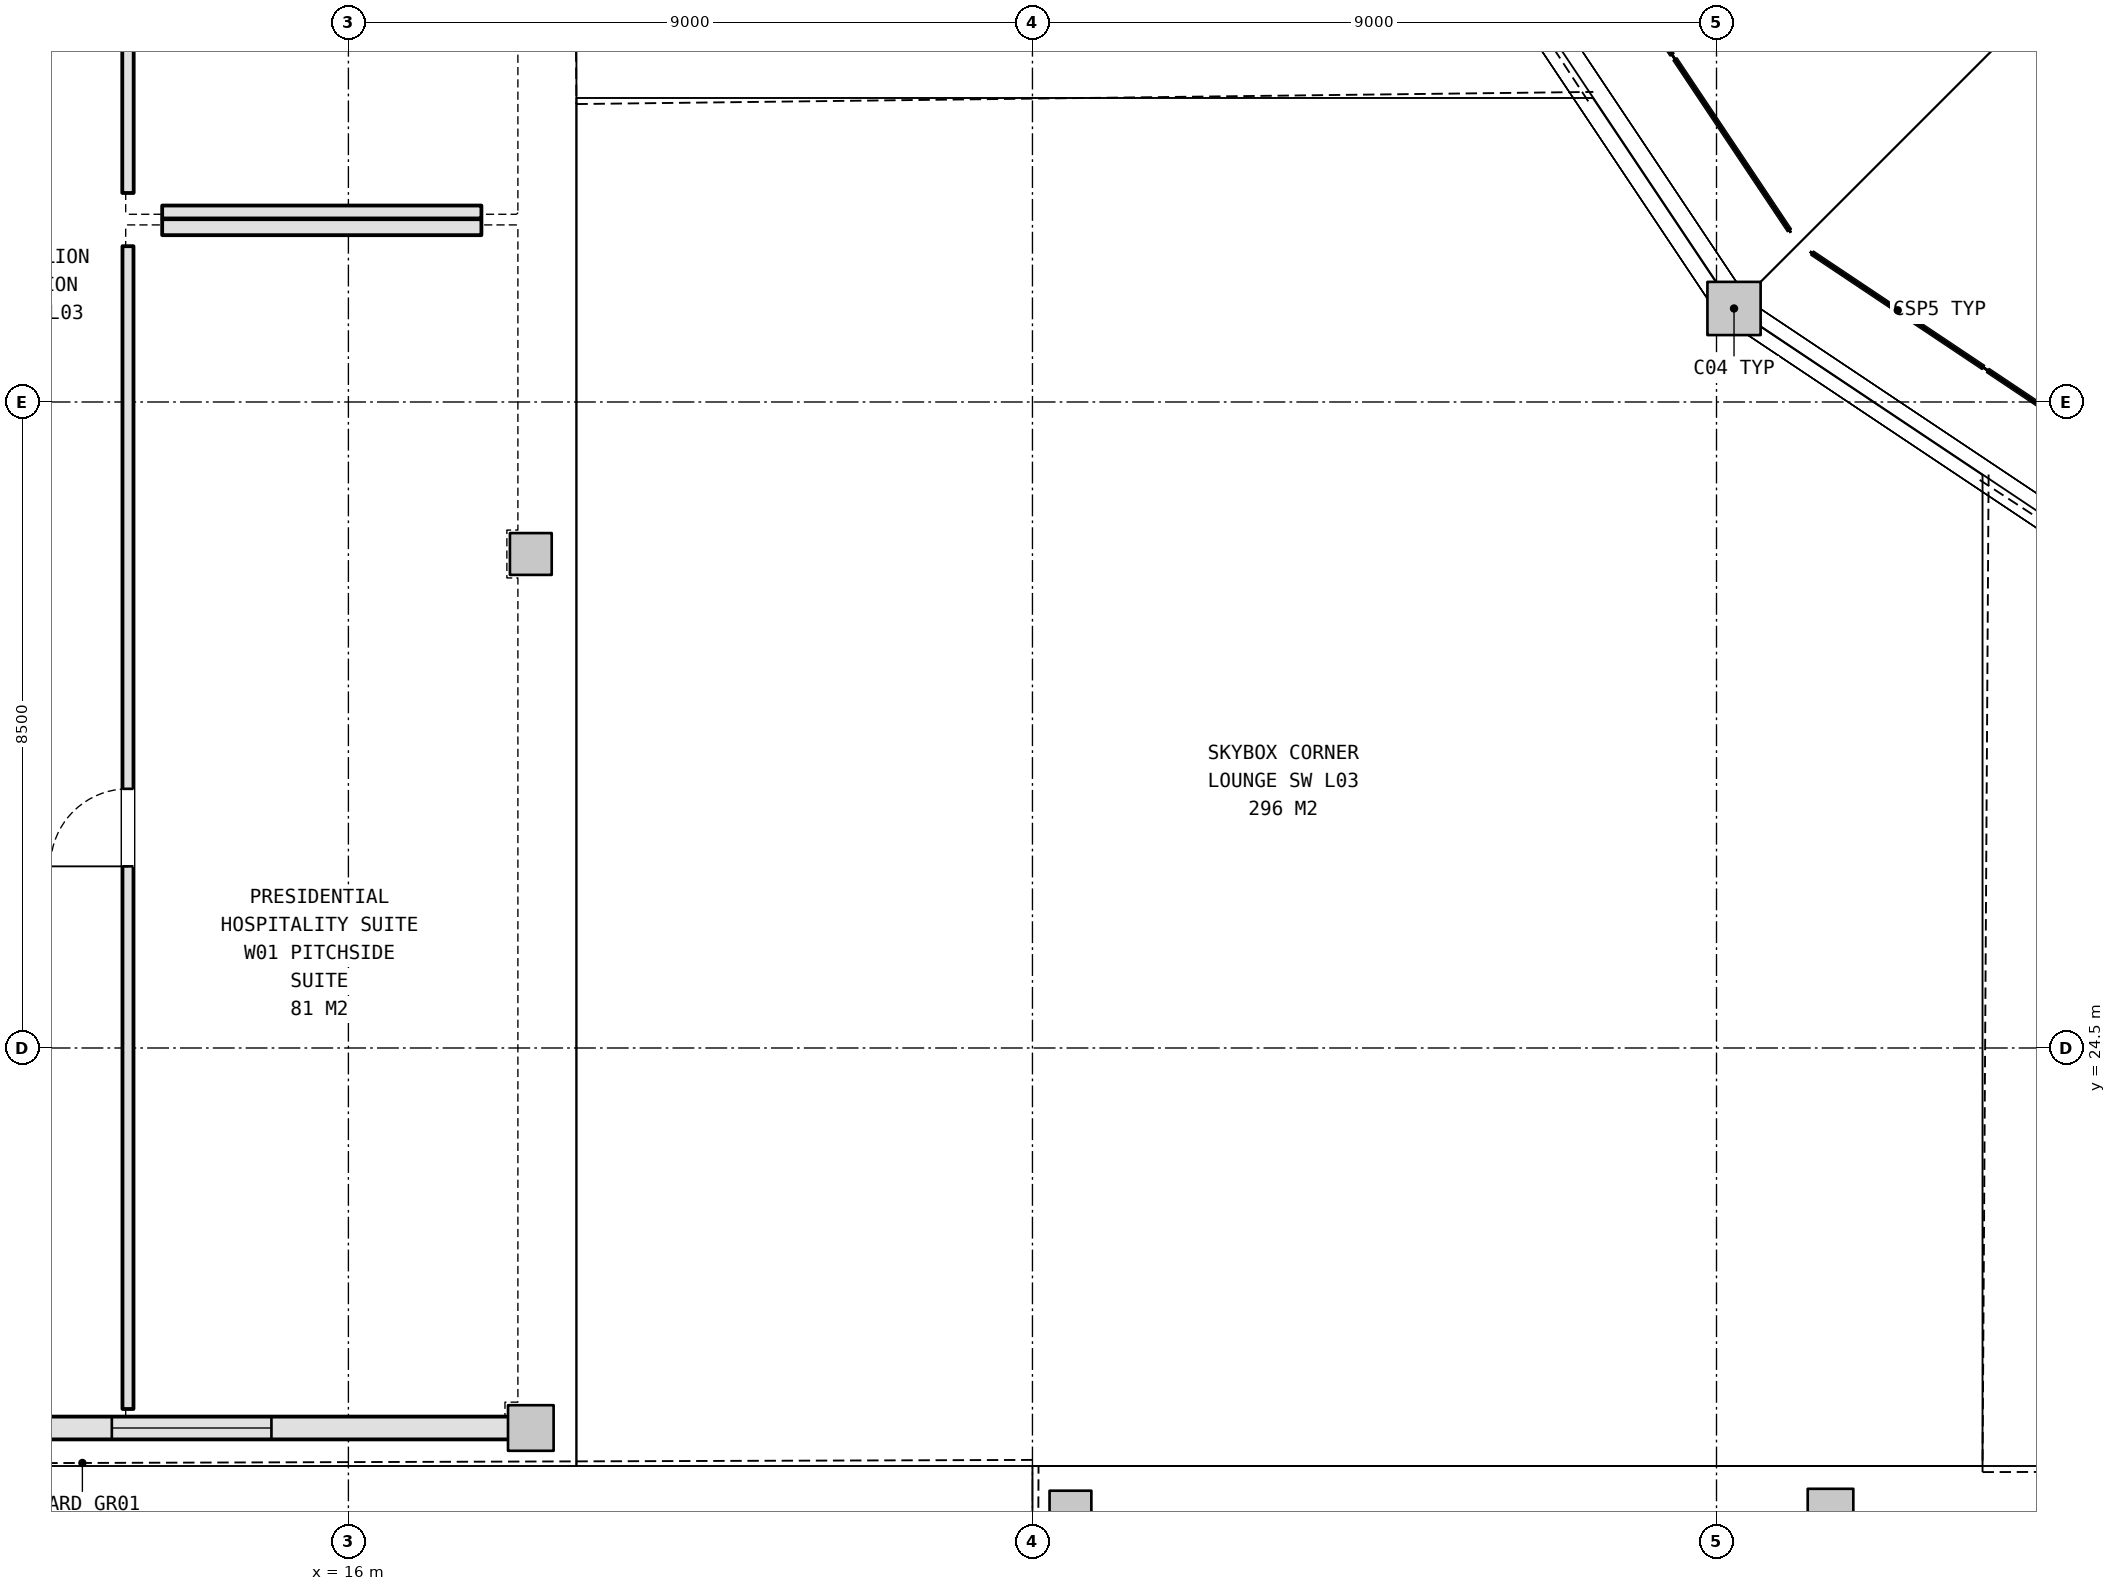
"""IFC4 building model, lengths in metres.
Left out: names, types, materials, properties, quantities, classifications, styles, units other than length and angle.
Written with IfcOpenShell. Run it as: python <this file> out.ifc"""

import sys

from ifc_helpers import new_model, si_unit, direction, frame, frame_2d, origin, origin_2d, place, context, subcontext, project, spatial, rectangle, extrude, element, fill, save


model = new_model("IFC4")
c1 = context("Model", 3, precision=1e-05, world=origin(), true_north=direction((0.0, 1.0)))
c2 = subcontext(c1, "Body", "Model", "MODEL_VIEW")
j1 = project(units=[si_unit("LENGTHUNIT", "METRE"), si_unit("PLANEANGLEUNIT", "RADIAN")], contexts=[c1])
p1 = place(None, origin())
s1 = spatial("IfcSite", under=j1, at=p1, CompositionType="ELEMENT")
p2 = place(p1, origin())
s2 = spatial("IfcBuilding", under=s1, at=p2, CompositionType="ELEMENT")
p3 = place(p2, frame((0.0, 0.0, 16.2)))
s3 = spatial("IfcBuildingStorey", under=s2, at=p3, CompositionType="ELEMENT", Elevation=16.2)
p4 = place(p3, frame((34.23, 34.23, 0.0), z_axis=(0.0, 0.0, 1.0), x_axis=(1.0, 0.0, 0.0)))
e1 = element("IfcColumn", 1, at=p4, inside=s3, PredefinedType="COLUMN", context=c2, shape_type="SweptSolid", body=[
    extrude(rectangle(XDim=0.7, YDim=0.7, at=origin_2d()), origin(), (0.0, 0.0, 1.0), 5.4),
])
p5 = place(p3, frame((18.4, 19.5, 0.0), z_axis=(0.0, 0.0, 1.0), x_axis=(1.0, 0.0, 0.0)))
e2 = element("IfcColumn", 2, at=p5, inside=s3, PredefinedType="COLUMN", context=c2, shape_type="SweptSolid", body=[
    extrude(rectangle(XDim=0.6, YDim=0.6, at=origin_2d()), origin(), (0.0, 0.0, 1.0), 5.4),
])
for number, where, z_axis, x_axis in (
    (3, (18.4, 31.0, 0.0), (0.0, 0.0, 1.0), (1.0, 0.0, 0.0)),
    (4, (25.5, 18.4, 0.0), (0.0, 0.0, 1.0), (1.0, 0.0, 0.0)),
):
    element("IfcColumn", number, at=place(p3, frame(where, z_axis=z_axis, x_axis=x_axis)), inside=s3, PredefinedType="COLUMN", context=c2, shape_type="SweptSolid", body=[
        extrude(rectangle(XDim=0.55, YDim=0.55, at=origin_2d()), origin(), (0.0, 0.0, 1.0), 5.4),
    ])
p6 = place(p3, frame((35.5, 18.4, 0.0), z_axis=(0.0, 0.0, 1.0), x_axis=(1.0, 0.0, 0.0)))
e5 = element("IfcColumn", 5, at=p6, inside=s3, PredefinedType="COLUMN", context=c2, shape_type="SweptSolid", body=[
    extrude(rectangle(XDim=0.6, YDim=0.6, at=origin_2d()), origin(), (0.0, 0.0, 1.0), 5.4),
])
p7 = place(p3, frame((9.763, 19.5, 0.0), z_axis=(0.0, 0.0, 1.0), x_axis=(1.0, 0.0, 0.0)))
e6 = element("IfcWall", 6, at=p7, inside=s3, PredefinedType="SOLIDWALL", context=c2, shape_type="SweptSolid", body=[
    extrude(rectangle(XDim=8.349, YDim=0.3, at=frame_2d((4.175, 0.0))), origin(), (0.0, 0.0, 1.0), 4.465),
])
p8 = place(p7, frame((3.125, 0.0, 1.05)))
e7 = element("IfcOpeningElement", 7, at=p8, cuts=e6, PredefinedType="OPENING", context=c2, shape_type="SweptSolid", body=[
    extrude(rectangle(XDim=2.1, YDim=2.1, at=frame_2d((1.05, 1.05))), frame((0.0, 0.16, 0.0), z_axis=(0.0, -1.0, 0.0), x_axis=(1.0, 0.0, 0.0)), (0.0, 0.0, 1.0), 0.32),
])
p9 = place(p3, frame((13.1, 19.75, 0.0), z_axis=(0.0, 0.0, 1.0), x_axis=(0.0, 1.0, 0.0)))
e8 = element("IfcWall", 8, at=p9, inside=s3, PredefinedType="PARTITIONING", context=c2, shape_type="SweptSolid", body=[
    extrude(rectangle(XDim=15.3, YDim=0.145, at=frame_2d((7.65, 0.0))), origin(), (0.0, 0.0, 1.0), 4.658),
])
p10 = place(p9, frame((7.14, 0.0, 0.0)))
e9 = element("IfcOpeningElement", 9, at=p10, cuts=e8, PredefinedType="OPENING", context=c2, shape_type="SweptSolid", body=[
    extrude(rectangle(XDim=1.02, YDim=2.15, at=frame_2d((0.51, 1.075))), frame((0.0, 0.083, 0.0), z_axis=(0.0, -1.0, 0.0), x_axis=(1.0, 0.0, 0.0)), (0.0, 0.0, 1.0), 0.165),
])
p11 = place(p3, frame((13.55, 35.3, 0.0), z_axis=(0.0, 0.0, 1.0), x_axis=(1.0, 0.0, 0.0)))
e10 = element("IfcWall", 10, at=p11, inside=s3, PredefinedType="PLUMBINGWALL", context=c2, shape_type="SweptSolid", body=[
    extrude(rectangle(XDim=4.2, YDim=0.21, at=frame_2d((2.1, 0.0))), origin(), (0.0, 0.0, 1.0), 5.12),
])
p12 = place(p3, frame((13.1, 35.75, 0.0), z_axis=(0.0, 0.0, 1.0), x_axis=(0.0, 1.0, 0.0)))
e11 = element("IfcWall", 11, at=p12, inside=s3, PredefinedType="PARTITIONING", context=c2, shape_type="SweptSolid", body=[
    extrude(rectangle(XDim=10.76, YDim=0.15, at=frame_2d((5.38, 0.0))), origin(), (0.0, 0.0, 1.0), 4.668),
])
p13 = place(p12, frame((4.88, 0.0, 0.0)))
e12 = element("IfcOpeningElement", 12, at=p13, cuts=e11, PredefinedType="OPENING", context=c2, shape_type="SweptSolid", body=[
    extrude(rectangle(XDim=1.0, YDim=2.15, at=frame_2d((0.5, 1.075))), frame((0.0, 0.085, 0.0), z_axis=(0.0, -1.0, 0.0), x_axis=(1.0, 0.0, 0.0)), (0.0, 0.0, 1.0), 0.17),
])
p14 = place(p3, frame((17.75, 35.5, 0.0), z_axis=(0.0, 0.0, 1.0), x_axis=(-1.0, 0.0, 0.0)))
e13 = element("IfcWall", 13, at=p14, inside=s3, PredefinedType="PARTITIONING", context=c2, shape_type="SweptSolid", body=[
    extrude(rectangle(XDim=4.2, YDim=0.17, at=frame_2d((2.1, 0.0))), origin(), (0.0, 0.0, 1.0), 5.12),
])
p15 = place(p8, origin())
e14 = element("IfcWindow", 14, at=p15, inside=s3, PartitioningType="SINGLE_PANEL", PredefinedType="WINDOW", context=c2, shape_type="SweptSolid", body=[
    extrude(rectangle(XDim=2.1, YDim=2.1, at=frame_2d((1.05, 1.05))), frame((0.0, 0.03, 0.0), z_axis=(0.0, -1.0, 0.0), x_axis=(1.0, 0.0, 0.0)), (0.0, 0.0, 1.0), 0.06),
])
fill(e7, e14)
p16 = place(p10, origin())
e15 = element("IfcDoor", 15, at=p16, inside=s3, OperationType="SINGLE_SWING_LEFT", PredefinedType="DOOR", context=c2, shape_type="SweptSolid", body=[
    extrude(rectangle(XDim=1.02, YDim=2.15, at=frame_2d((0.51, 1.075))), frame((0.0, 0.025, 0.0), z_axis=(0.0, -1.0, 0.0), x_axis=(1.0, 0.0, 0.0)), (0.0, 0.0, 1.0), 0.05),
])
fill(e9, e15)
save(model, sys.argv[1])
